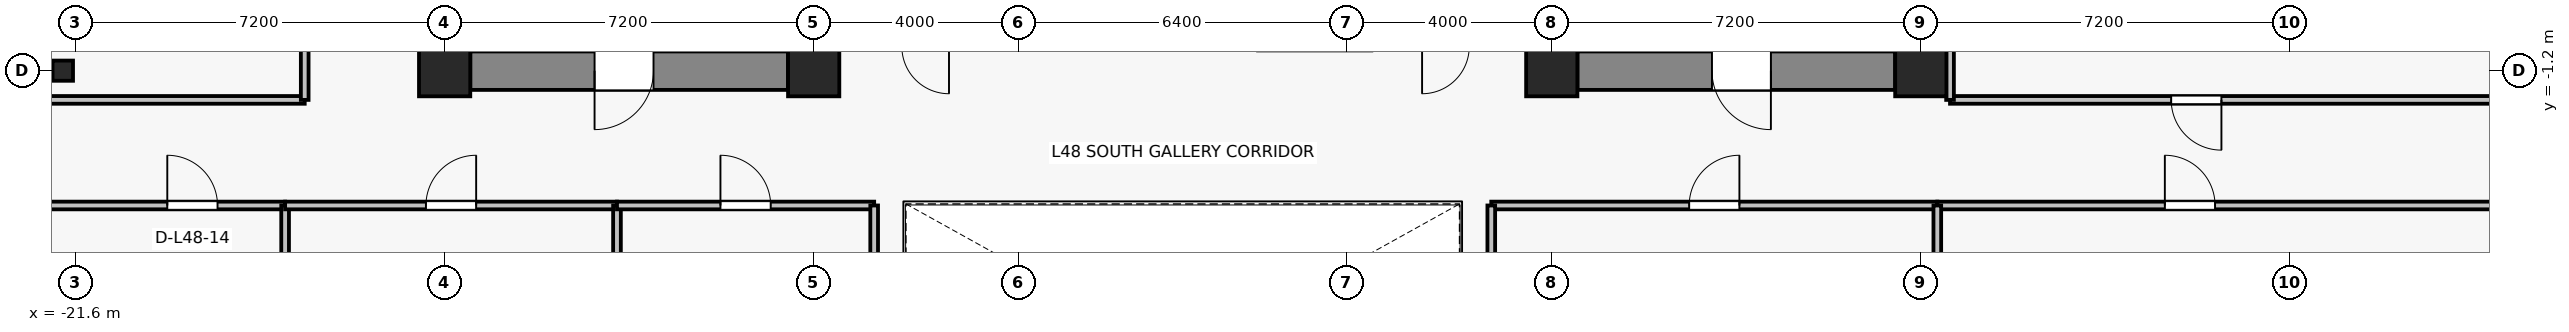
"""IFC4 building model, lengths in metres.
Left out: names, types, materials, properties, quantities, classifications, styles, units other than length and angle.
Written with IfcOpenShell. Run it as: python <this file> out.ifc"""

import sys

from ifc_helpers import new_model, si_unit, direction, frame, frame_2d, origin, origin_2d, place, context, subcontext, project, spatial, rectangle, i_section, extrude, source, transform, mapped, element, fill, save


model = new_model("IFC4")
c1 = context("Model", 3, precision=1e-05, world=origin(), true_north=direction((0.0, 1.0)))
c2 = subcontext(c1, "Body", "Model", "MODEL_VIEW")
j1 = project(units=[si_unit("LENGTHUNIT", "METRE"), si_unit("PLANEANGLEUNIT", "RADIAN")], contexts=[c1])
p1 = place(None, origin())
s1 = spatial("IfcSite", under=j1, at=p1, CompositionType="ELEMENT")
p2 = place(p1, origin())
s2 = spatial("IfcBuilding", under=s1, at=p2, CompositionType="ELEMENT")
p3 = place(p2, frame((0.0, 0.0, 172.6)))
s3 = spatial("IfcBuildingStorey", under=s2, at=p3, CompositionType="ELEMENT", Elevation=172.6)
for number, where, z_axis, x_axis in (
    (1, (-14.4, -1.2, 0.0), (0.0, 0.0, 1.0), (1.0, 0.0, 0.0)),
    (2, (-7.2, -1.2, 0.0), (0.0, 0.0, 1.0), (1.0, 0.0, 0.0)),
    (3, (7.2, -1.2, 0.0), (0.0, 0.0, 1.0), (1.0, 0.0, 0.0)),
    (4, (14.4, -1.2, 0.0), (0.0, 0.0, 1.0), (1.0, 0.0, 0.0)),
):
    element("IfcColumn", number, at=place(p3, frame(where, z_axis=z_axis, x_axis=x_axis)), inside=s3, PredefinedType="COLUMN", context=c2, shape_type="SweptSolid", body=[
        extrude(rectangle(XDim=1.0, YDim=1.0, at=origin_2d()), origin(), (0.0, 0.0, 1.0), 3.3),
    ])
p4 = place(p3, frame((-21.85, -1.2, 0.0), z_axis=(0.0, 0.0, 1.0), x_axis=(1.0, 0.0, 0.0)))
e5 = element("IfcColumn", 5, at=p4, inside=s3, PredefinedType="COLUMN", context=c2, shape_type="SweptSolid", body=[
    extrude(i_section(OverallWidth=0.399, OverallDepth=0.394, WebThickness=0.023, FlangeThickness=0.037, FilletRadius=0.015, at=origin_2d()), origin(), (0.0, 0.0, 1.0), 3.3),
])
p5 = place(p3, frame((-7.7, -1.2, 0.0), z_axis=(0.0, 0.0, 1.0), x_axis=(-1.0, 0.0, 0.0)))
e6 = element("IfcWall", 6, at=p5, inside=s3, PredefinedType="SHEAR", context=c2, shape_type="SweptSolid", body=[
    extrude(rectangle(XDim=6.2, YDim=0.75, at=frame_2d((3.1, 0.0))), origin(), (0.0, 0.0, 1.0), 3.075),
])
p6 = place(p5, frame((2.625, 0.0, 0.0)))
e7 = element("IfcOpeningElement", 7, at=p6, cuts=e6, PredefinedType="OPENING", context=c2, shape_type="SweptSolid", body=[
    extrude(rectangle(XDim=1.15, YDim=2.15, at=frame_2d((0.575, 1.075))), frame((0.0, 0.385, 0.0), z_axis=(0.0, -1.0, 0.0), x_axis=(1.0, 0.0, 0.0)), (0.0, 0.0, 1.0), 0.77),
])
p7 = place(p3, frame((13.9, -1.2, 0.0), z_axis=(0.0, 0.0, 1.0), x_axis=(-1.0, 0.0, 0.0)))
e8 = element("IfcWall", 8, at=p7, inside=s3, PredefinedType="SHEAR", context=c2, shape_type="SweptSolid", body=[
    extrude(rectangle(XDim=6.2, YDim=0.75, at=frame_2d((3.1, 0.0))), origin(), (0.0, 0.0, 1.0), 3.075),
])
p8 = place(p7, frame((2.425, 0.0, 0.0)))
e9 = element("IfcOpeningElement", 9, at=p8, cuts=e8, PredefinedType="OPENING", context=c2, shape_type="SweptSolid", body=[
    extrude(rectangle(XDim=1.15, YDim=2.15, at=frame_2d((0.575, 1.075))), frame((0.0, 0.385, 0.0), z_axis=(0.0, -1.0, 0.0), x_axis=(1.0, 0.0, 0.0)), (0.0, 0.0, 1.0), 0.77),
])
p9 = place(p3, frame((-22.53, -3.83, 0.0), z_axis=(0.0, 0.0, 1.0), x_axis=(1.0, 0.0, 0.0)))
e10 = element("IfcWall", 10, at=p9, inside=s3, PredefinedType="PARTITIONING", context=c2, shape_type="SweptSolid", body=[
    extrude(rectangle(XDim=5.018, YDim=0.15, at=frame_2d((2.509, 0.0))), origin(), (0.0, 0.0, 1.0), 2.565),
])
p10 = place(p9, frame((2.719, 0.0, 0.0)))
e11 = element("IfcOpeningElement", 11, at=p10, cuts=e10, PredefinedType="OPENING", context=c2, shape_type="SweptSolid", body=[
    extrude(rectangle(XDim=0.98, YDim=2.15, at=frame_2d((0.49, 1.075))), frame((0.0, 0.085, 0.0), z_axis=(0.0, -1.0, 0.0), x_axis=(1.0, 0.0, 0.0)), (0.0, 0.0, 1.0), 0.17),
])
p11 = place(p3, frame((-17.512, -3.83, 0.0), z_axis=(0.0, 0.0, 1.0), x_axis=(0.0, -1.0, 0.0)))
e12 = element("IfcWall", 12, at=p11, inside=s3, PredefinedType="PARTITIONING", context=c2, shape_type="SweptSolid", body=[
    extrude(rectangle(XDim=13.5, YDim=0.15, at=frame_2d((6.75, 0.0))), origin(), (0.0, 0.0, 1.0), 2.565),
])
p12 = place(p3, frame((-17.512, -3.83, 0.0), z_axis=(0.0, 0.0, 1.0), x_axis=(1.0, 0.0, 0.0)))
e13 = element("IfcWall", 13, at=p12, inside=s3, PredefinedType="PARTITIONING", context=c2, shape_type="SweptSolid", body=[
    extrude(rectangle(XDim=6.475, YDim=0.15, at=frame_2d((3.237, 0.0))), origin(), (0.0, 0.0, 1.0), 2.565),
])
p13 = place(p12, frame((2.747, 0.0, 0.0)))
e14 = element("IfcOpeningElement", 14, at=p13, cuts=e13, PredefinedType="OPENING", context=c2, shape_type="SweptSolid", body=[
    extrude(rectangle(XDim=0.98, YDim=2.15, at=frame_2d((0.49, 1.075))), frame((0.0, 0.085, 0.0), z_axis=(0.0, -1.0, 0.0), x_axis=(1.0, 0.0, 0.0)), (0.0, 0.0, 1.0), 0.17),
])
p14 = place(p3, frame((-11.038, -3.83, 0.0), z_axis=(0.0, 0.0, 1.0), x_axis=(0.0, -1.0, 0.0)))
e15 = element("IfcWall", 15, at=p14, inside=s3, PredefinedType="PARTITIONING", context=c2, shape_type="SweptSolid", body=[
    extrude(rectangle(XDim=13.5, YDim=0.15, at=frame_2d((6.75, 0.0))), origin(), (0.0, 0.0, 1.0), 2.565),
])
p15 = place(p3, frame((-11.038, -3.83, 0.0), z_axis=(0.0, 0.0, 1.0), x_axis=(1.0, 0.0, 0.0)))
e16 = element("IfcWall", 16, at=p15, inside=s3, PredefinedType="PARTITIONING", context=c2, shape_type="SweptSolid", body=[
    extrude(rectangle(XDim=5.018, YDim=0.15, at=frame_2d((2.509, 0.0))), origin(), (0.0, 0.0, 1.0), 2.565),
])
p16 = place(p15, frame((2.019, 0.0, 0.0)))
e17 = element("IfcOpeningElement", 17, at=p16, cuts=e16, PredefinedType="OPENING", context=c2, shape_type="SweptSolid", body=[
    extrude(rectangle(XDim=0.98, YDim=2.15, at=frame_2d((0.49, 1.075))), frame((0.0, 0.085, 0.0), z_axis=(0.0, -1.0, 0.0), x_axis=(1.0, 0.0, 0.0)), (0.0, 0.0, 1.0), 0.17),
])
p17 = place(p3, frame((-6.02, -3.83, 0.0), z_axis=(0.0, 0.0, 1.0), x_axis=(0.0, -1.0, 0.0)))
e18 = element("IfcWall", 18, at=p17, inside=s3, PredefinedType="PARTITIONING", context=c2, shape_type="SweptSolid", body=[
    extrude(rectangle(XDim=13.5, YDim=0.15, at=frame_2d((6.75, 0.0))), origin(), (0.0, 0.0, 1.0), 2.565),
])
p18 = place(p3, frame((6.02, -3.83, 0.0), z_axis=(0.0, 0.0, 1.0), x_axis=(1.0, 0.0, 0.0)))
e19 = element("IfcWall", 19, at=p18, inside=s3, PredefinedType="PARTITIONING", context=c2, shape_type="SweptSolid", body=[
    extrude(rectangle(XDim=8.702, YDim=0.15, at=frame_2d((4.351, 0.0))), origin(), (0.0, 0.0, 1.0), 2.565),
])
p19 = place(p18, frame((3.861, 0.0, 0.0)))
e20 = element("IfcOpeningElement", 20, at=p19, cuts=e19, PredefinedType="OPENING", context=c2, shape_type="SweptSolid", body=[
    extrude(rectangle(XDim=0.98, YDim=2.15, at=frame_2d((0.49, 1.075))), frame((0.0, 0.085, 0.0), z_axis=(0.0, -1.0, 0.0), x_axis=(1.0, 0.0, 0.0)), (0.0, 0.0, 1.0), 0.17),
])
p20 = place(p3, frame((6.02, -17.33, 0.0), z_axis=(0.0, 0.0, 1.0), x_axis=(0.0, 1.0, 0.0)))
e21 = element("IfcWall", 21, at=p20, inside=s3, PredefinedType="PARTITIONING", context=c2, shape_type="SweptSolid", body=[
    extrude(rectangle(XDim=13.5, YDim=0.15, at=frame_2d((6.75, 0.0))), origin(), (0.0, 0.0, 1.0), 2.565),
])
p21 = place(p3, frame((14.722, -3.83, 0.0), z_axis=(0.0, 0.0, 1.0), x_axis=(1.0, 0.0, 0.0)))
e22 = element("IfcWall", 22, at=p21, inside=s3, PredefinedType="PARTITIONING", context=c2, shape_type="SweptSolid", body=[
    extrude(rectangle(XDim=11.808, YDim=0.15, at=frame_2d((5.904, 0.0))), origin(), (0.0, 0.0, 1.0), 2.565),
])
p22 = place(p21, frame((4.439, 0.0, 0.0)))
e23 = element("IfcOpeningElement", 23, at=p22, cuts=e22, PredefinedType="OPENING", context=c2, shape_type="SweptSolid", body=[
    extrude(rectangle(XDim=0.98, YDim=2.15, at=frame_2d((0.49, 1.075))), frame((0.0, 0.085, 0.0), z_axis=(0.0, -1.0, 0.0), x_axis=(1.0, 0.0, 0.0)), (0.0, 0.0, 1.0), 0.17),
])
p23 = place(p3, frame((14.722, -9.18, 0.0), z_axis=(0.0, 0.0, 1.0), x_axis=(0.0, 1.0, 0.0)))
e24 = element("IfcWall", 24, at=p23, inside=s3, PredefinedType="PARTITIONING", context=c2, shape_type="SweptSolid", body=[
    extrude(rectangle(XDim=5.35, YDim=0.15, at=frame_2d((2.675, 0.0))), origin(), (0.0, 0.0, 1.0), 2.665),
])
p24 = place(p3, frame((-17.13, -1.77, 0.0), z_axis=(0.0, 0.0, 1.0), x_axis=(-1.0, 0.0, 0.0)))
e25 = element("IfcWall", 25, at=p24, inside=s3, PredefinedType="PARTITIONING", context=c2, shape_type="SweptSolid", body=[
    extrude(rectangle(XDim=5.4, YDim=0.15, at=frame_2d((2.7, 0.0))), origin(), (0.0, 0.0, 1.0), 2.565),
])
p25 = place(p3, frame((-17.13, 3.298, 0.0), z_axis=(0.0, 0.0, 1.0), x_axis=(0.0, -1.0, 0.0)))
e26 = element("IfcWall", 26, at=p25, inside=s3, PredefinedType="PARTITIONING", context=c2, shape_type="SweptSolid", body=[
    extrude(rectangle(XDim=5.068, YDim=0.15, at=frame_2d((2.534, 0.0))), origin(), (0.0, 0.0, 1.0), 2.565),
])
p26 = place(p25, frame((2.044, 0.0, 0.0)))
e27 = element("IfcOpeningElement", 27, at=p26, cuts=e26, PredefinedType="OPENING", context=c2, shape_type="SweptSolid", body=[
    extrude(rectangle(XDim=0.98, YDim=2.15, at=frame_2d((0.49, 1.075))), frame((0.0, 0.085, 0.0), z_axis=(0.0, -1.0, 0.0), x_axis=(1.0, 0.0, 0.0)), (0.0, 0.0, 1.0), 0.17),
])
p27 = place(p3, frame((26.53, -1.77, 0.0), z_axis=(0.0, 0.0, 1.0), x_axis=(-1.0, 0.0, 0.0)))
e28 = element("IfcWall", 28, at=p27, inside=s3, PredefinedType="PARTITIONING", context=c2, shape_type="SweptSolid", body=[
    extrude(rectangle(XDim=11.56, YDim=0.15, at=frame_2d((5.78, 0.0))), origin(), (0.0, 0.0, 1.0), 2.565),
])
p28 = place(p27, frame((6.265, 0.0, 0.0)))
e29 = element("IfcOpeningElement", 29, at=p28, cuts=e28, PredefinedType="OPENING", context=c2, shape_type="SweptSolid", body=[
    extrude(rectangle(XDim=0.98, YDim=2.15, at=frame_2d((0.49, 1.075))), frame((0.0, 0.085, 0.0), z_axis=(0.0, -1.0, 0.0), x_axis=(1.0, 0.0, 0.0)), (0.0, 0.0, 1.0), 0.17),
])
p29 = place(p3, frame((14.97, -1.77, 0.0), z_axis=(0.0, 0.0, 1.0), x_axis=(0.0, 1.0, 0.0)))
e30 = element("IfcWall", 30, at=p29, inside=s3, PredefinedType="PARTITIONING", context=c2, shape_type="SweptSolid", body=[
    extrude(rectangle(XDim=1.07, YDim=0.15, at=frame_2d((0.535, 0.0))), origin(), (0.0, 0.0, 1.0), 2.565),
])
m1 = source(origin(), c2, "Body", "SweptSolid", [
    extrude(rectangle(XDim=1.15, YDim=2.15, at=frame_2d((0.575, 1.075))), frame((0.0, 0.025, 0.0), z_axis=(0.0, -1.0, 0.0), x_axis=(1.0, 0.0, 0.0)), (0.0, 0.0, 1.0), 0.05),
])
p30 = place(p6, origin())
e31 = element("IfcDoor", 31, at=p30, inside=s3, OperationType="SINGLE_SWING_RIGHT", PredefinedType="DOOR", context=c2, shape_type="MappedRepresentation", body=[
    mapped(m1, transform((0.0, 0.0, 0.0), x_axis=(1.0, 0.0, 0.0), y_axis=(0.0, 1.0, 0.0), z_axis=(0.0, 0.0, 1.0), scale=1.0)),
])
fill(e7, e31)
p31 = place(p8, origin())
e32 = element("IfcDoor", 32, at=p31, inside=s3, OperationType="SINGLE_SWING_LEFT", PredefinedType="DOOR", context=c2, shape_type="MappedRepresentation", body=[
    mapped(m1, transform((0.0, 0.0, 0.0), x_axis=(1.0, 0.0, 0.0), y_axis=(0.0, 1.0, 0.0), z_axis=(0.0, 0.0, 1.0), scale=1.0)),
])
fill(e9, e32)
m2 = source(origin(), c2, "Body", "SweptSolid", [
    extrude(rectangle(XDim=0.98, YDim=2.15, at=frame_2d((0.49, 1.075))), frame((0.0, 0.025, 0.0), z_axis=(0.0, -1.0, 0.0), x_axis=(1.0, 0.0, 0.0)), (0.0, 0.0, 1.0), 0.05),
])
p32 = place(p10, origin())
e33 = element("IfcDoor", 33, at=p32, inside=s3, OperationType="SINGLE_SWING_LEFT", PredefinedType="DOOR", context=c2, shape_type="MappedRepresentation", body=[
    mapped(m2, transform((0.0, 0.0, 0.0), x_axis=(1.0, 0.0, 0.0), y_axis=(0.0, 1.0, 0.0), z_axis=(0.0, 0.0, 1.0), scale=1.0)),
])
fill(e11, e33)
p33 = place(p13, origin())
e34 = element("IfcDoor", 34, at=p33, inside=s3, OperationType="SINGLE_SWING_RIGHT", PredefinedType="DOOR", context=c2, shape_type="MappedRepresentation", body=[
    mapped(m2, transform((0.0, 0.0, 0.0), x_axis=(1.0, 0.0, 0.0), y_axis=(0.0, 1.0, 0.0), z_axis=(0.0, 0.0, 1.0), scale=1.0)),
])
fill(e14, e34)
p34 = place(p16, origin())
e35 = element("IfcDoor", 35, at=p34, inside=s3, OperationType="SINGLE_SWING_LEFT", PredefinedType="DOOR", context=c2, shape_type="MappedRepresentation", body=[
    mapped(m2, transform((0.0, 0.0, 0.0), x_axis=(1.0, 0.0, 0.0), y_axis=(0.0, 1.0, 0.0), z_axis=(0.0, 0.0, 1.0), scale=1.0)),
])
fill(e17, e35)
p35 = place(p19, origin())
e36 = element("IfcDoor", 36, at=p35, inside=s3, OperationType="SINGLE_SWING_RIGHT", PredefinedType="DOOR", context=c2, shape_type="MappedRepresentation", body=[
    mapped(m2, transform((0.0, 0.0, 0.0), x_axis=(1.0, 0.0, 0.0), y_axis=(0.0, 1.0, 0.0), z_axis=(0.0, 0.0, 1.0), scale=1.0)),
])
fill(e20, e36)
p36 = place(p22, origin())
e37 = element("IfcDoor", 37, at=p36, inside=s3, OperationType="SINGLE_SWING_LEFT", PredefinedType="DOOR", context=c2, shape_type="MappedRepresentation", body=[
    mapped(m2, transform((0.0, 0.0, 0.0), x_axis=(1.0, 0.0, 0.0), y_axis=(0.0, 1.0, 0.0), z_axis=(0.0, 0.0, 1.0), scale=1.0)),
])
fill(e23, e37)
p37 = place(p28, origin())
e38 = element("IfcDoor", 38, at=p37, inside=s3, OperationType="SINGLE_SWING_LEFT", PredefinedType="DOOR", context=c2, shape_type="MappedRepresentation", body=[
    mapped(m2, transform((0.0, 0.0, 0.0), x_axis=(1.0, 0.0, 0.0), y_axis=(0.0, 1.0, 0.0), z_axis=(0.0, 0.0, 1.0), scale=1.0)),
])
fill(e29, e38)
save(model, sys.argv[1])
